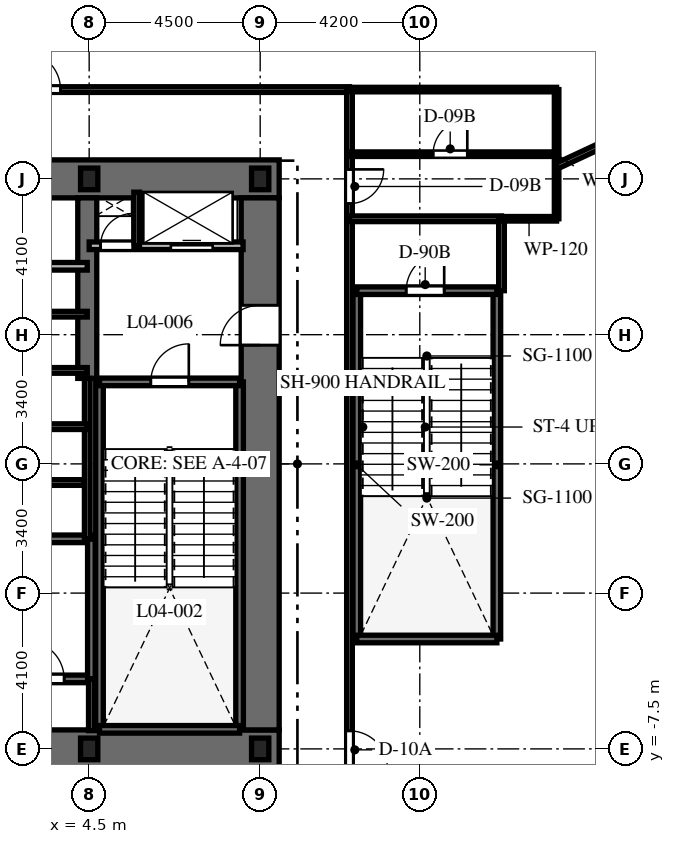
"""IFC4 building model, lengths in metres.
Left out: names, types, materials, properties, quantities, classifications, styles, units other than length and angle.
Written with IfcOpenShell. Run it as: python <this file> out.ifc"""

import sys

from ifc_helpers import new_model, si_unit, direction, frame, frame_2d, origin, origin_2d, place, context, subcontext, project, spatial, rectangle, i_section, extrude, element, fill, save


model = new_model("IFC4")
c1 = context("Model", 3, precision=1e-05, world=origin(), true_north=direction((0.0, 1.0)))
c2 = subcontext(c1, "Body", "Model", "MODEL_VIEW")
j1 = project(units=[si_unit("LENGTHUNIT", "METRE"), si_unit("PLANEANGLEUNIT", "RADIAN")], contexts=[c1])
p1 = place(None, origin())
s1 = spatial("IfcSite", under=j1, at=p1, CompositionType="ELEMENT")
p2 = place(p1, origin())
s2 = spatial("IfcBuilding", under=s1, at=p2, CompositionType="ELEMENT")
p3 = place(p2, frame((0.0, 0.0, 23.4)))
s3 = spatial("IfcBuildingStorey", under=s2, at=p3, CompositionType="ELEMENT", Elevation=23.4)
p4 = place(p3, frame((-9.5, -7.5, 0.0), z_axis=(0.0, 0.0, 1.0), x_axis=(1.0, 0.0, 0.0)))
e1 = element("IfcWall", 1, at=p4, inside=s3, PredefinedType="SHEAR", context=c2, shape_type="SweptSolid", body=[
    extrude(rectangle(XDim=19.0, YDim=1.0, at=frame_2d((9.5, 0.0))), origin(), (0.0, 0.0, 1.0), 4.8),
])
p5 = place(p4, frame((9.55, 0.0, 0.0)))
e2 = element("IfcOpeningElement", 2, at=p5, cuts=e1, PredefinedType="OPENING", context=c2, shape_type="SweptSolid", body=[
    extrude(rectangle(XDim=1.0, YDim=2.15, at=frame_2d((0.5, 1.075))), frame((0.0, 0.51, 0.0), z_axis=(0.0, -1.0, 0.0), x_axis=(1.0, 0.0, 0.0)), (0.0, 0.0, 1.0), 1.02),
])
p6 = place(p3, frame((1.85, 7.5, 0.0), z_axis=(0.0, 0.0, 1.0), x_axis=(1.0, 0.0, 0.0)))
e3 = element("IfcWall", 3, at=p6, inside=s3, PredefinedType="SHEAR", context=c2, shape_type="SweptSolid", body=[
    extrude(rectangle(XDim=7.65, YDim=1.0, at=frame_2d((3.825, 0.0))), origin(), (0.0, 0.0, 1.0), 4.8),
])
p7 = place(p3, frame((9.0, -7.0, 0.0), z_axis=(0.0, 0.0, 1.0), x_axis=(0.0, 1.0, 0.0)))
e4 = element("IfcWall", 4, at=p7, inside=s3, PredefinedType="SHEAR", context=c2, shape_type="SweptSolid", body=[
    extrude(rectangle(XDim=14.0, YDim=1.0, at=frame_2d((7.0, 0.0))), origin(), (0.0, 0.0, 1.0), 4.8),
])
p8 = place(p7, frame((10.125, 0.0, 0.0)))
e5 = element("IfcOpeningElement", 5, at=p8, cuts=e4, PredefinedType="OPENING", context=c2, shape_type="SweptSolid", body=[
    extrude(rectangle(XDim=1.05, YDim=2.15, at=frame_2d((0.525, 1.075))), frame((0.0, 0.51, 0.0), z_axis=(0.0, -1.0, 0.0), x_axis=(1.0, 0.0, 0.0)), (0.0, 0.0, 1.0), 1.02),
])
p9 = place(p3, frame((4.45, 2.25, 0.0), z_axis=(0.0, 0.0, 1.0), x_axis=(0.0, 1.0, 0.0)))
e6 = element("IfcWall", 6, at=p9, inside=s3, PredefinedType="SHEAR", context=c2, shape_type="SweptSolid", body=[
    extrude(rectangle(XDim=4.75, YDim=0.5, at=frame_2d((2.375, 0.0))), origin(), (0.0, 0.0, 1.0), 4.8),
])
for number, where, z_axis, x_axis in (
    (7, (4.772, -6.985, 0.0), (0.0, 0.0, 1.0), (0.0, 1.0, 0.0)),
    (8, (8.458, -6.985, 0.0), (0.0, 0.0, 1.0), (0.0, 1.0, 0.0)),
):
    element("IfcWall", number, at=place(p3, frame(where, z_axis=z_axis, x_axis=x_axis)), inside=s3, PredefinedType="SHEAR", context=c2, shape_type="SweptSolid", body=[
        extrude(rectangle(XDim=9.143, YDim=0.2, at=frame_2d((4.572, 0.0))), origin(), (0.0, 0.0, 1.0), 4.8),
    ])
p10 = place(p3, frame((4.772, -6.985, 0.0), z_axis=(0.0, 0.0, 1.0), x_axis=(1.0, 0.0, 0.0)))
e9 = element("IfcWall", 9, at=p10, inside=s3, PredefinedType="SHEAR", context=c2, shape_type="SweptSolid", body=[
    extrude(rectangle(XDim=3.686, YDim=0.2, at=frame_2d((1.843, 0.0))), origin(), (0.0, 0.0, 1.0), 4.8),
])
p11 = place(p3, frame((4.772, 2.158, 0.0), z_axis=(0.0, 0.0, 1.0), x_axis=(1.0, 0.0, 0.0)))
e10 = element("IfcWall", 10, at=p11, inside=s3, PredefinedType="SHEAR", context=c2, shape_type="SweptSolid", body=[
    extrude(rectangle(XDim=3.686, YDim=0.2, at=frame_2d((1.843, 0.0))), origin(), (0.0, 0.0, 1.0), 4.8),
])
p12 = place(p11, frame((1.35, 0.0, 0.0)))
e11 = element("IfcOpeningElement", 11, at=p12, cuts=e10, PredefinedType="OPENING", context=c2, shape_type="SweptSolid", body=[
    extrude(rectangle(XDim=1.0, YDim=2.15, at=frame_2d((0.5, 1.075))), frame((0.0, 0.11, 0.0), z_axis=(0.0, -1.0, 0.0), x_axis=(1.0, 0.0, 0.0)), (0.0, 0.0, 1.0), 0.22),
])
p13 = place(p3, frame((-4.608, -5.658, 0.0), z_axis=(0.0, 0.0, 1.0), x_axis=(1.0, 0.0, 0.0)))
e12 = element("IfcWall", 12, at=p13, inside=s3, PredefinedType="SHEAR", context=c2, shape_type="SweptSolid", body=[
    extrude(rectangle(XDim=9.166, YDim=0.2, at=frame_2d((4.583, 0.0))), origin(), (0.0, 0.0, 1.0), 4.8),
])
p14 = place(p13, frame((7.45, 0.0, 0.0)))
e13 = element("IfcOpeningElement", 13, at=p14, cuts=e12, PredefinedType="OPENING", context=c2, shape_type="SweptSolid", body=[
    extrude(rectangle(XDim=1.0, YDim=2.15, at=frame_2d((0.5, 1.075))), frame((0.0, 0.11, 0.0), z_axis=(0.0, -1.0, 0.0), x_axis=(1.0, 0.0, 0.0)), (0.0, 0.0, 1.0), 0.22),
])
p15 = place(p3, frame((-4.608, -1.972, 0.0), z_axis=(0.0, 0.0, 1.0), x_axis=(1.0, 0.0, 0.0)))
e14 = element("IfcWall", 14, at=p15, inside=s3, PredefinedType="SHEAR", context=c2, shape_type="SweptSolid", body=[
    extrude(rectangle(XDim=9.166, YDim=0.2, at=frame_2d((4.583, 0.0))), origin(), (0.0, 0.0, 1.0), 4.8),
])
p16 = place(p3, frame((4.558, -5.658, 0.0), z_axis=(0.0, 0.0, 1.0), x_axis=(0.0, 1.0, 0.0)))
e15 = element("IfcWall", 15, at=p16, inside=s3, PredefinedType="SHEAR", context=c2, shape_type="SweptSolid", body=[
    extrude(rectangle(XDim=3.686, YDim=0.2, at=frame_2d((1.843, 0.0))), origin(), (0.0, 0.0, 1.0), 4.8),
])
for number, where, z_axis, x_axis in (
    (16, (11.542, -4.608, 0.0), (0.0, 0.0, 1.0), (0.0, 1.0, 0.0)),
    (17, (15.228, -4.608, 0.0), (0.0, 0.0, 1.0), (0.0, 1.0, 0.0)),
):
    element("IfcWall", number, at=place(p3, frame(where, z_axis=z_axis, x_axis=x_axis)), inside=s3, PredefinedType="SHEAR", context=c2, shape_type="SweptSolid", body=[
        extrude(rectangle(XDim=9.166, YDim=0.2, at=frame_2d((4.583, 0.0))), origin(), (0.0, 0.0, 1.0), 4.8),
    ])
p17 = place(p3, frame((11.542, -4.608, 0.0), z_axis=(0.0, 0.0, 1.0), x_axis=(1.0, 0.0, 0.0)))
e18 = element("IfcWall", 18, at=p17, inside=s3, PredefinedType="SHEAR", context=c2, shape_type="SweptSolid", body=[
    extrude(rectangle(XDim=3.686, YDim=0.2, at=frame_2d((1.843, 0.0))), origin(), (0.0, 0.0, 1.0), 4.8),
])
p18 = place(p3, frame((11.542, 4.558, 0.0), z_axis=(0.0, 0.0, 1.0), x_axis=(1.0, 0.0, 0.0)))
e19 = element("IfcWall", 19, at=p18, inside=s3, PredefinedType="SHEAR", context=c2, shape_type="SweptSolid", body=[
    extrude(rectangle(XDim=3.686, YDim=0.2, at=frame_2d((1.843, 0.0))), origin(), (0.0, 0.0, 1.0), 4.8),
])
p19 = place(p18, frame((1.3, 0.0, 0.0)))
e20 = element("IfcOpeningElement", 20, at=p19, cuts=e19, PredefinedType="OPENING", context=c2, shape_type="SweptSolid", body=[
    extrude(rectangle(XDim=1.0, YDim=2.15, at=frame_2d((0.5, 1.075))), frame((0.0, 0.11, 0.0), z_axis=(0.0, -1.0, 0.0), x_axis=(1.0, 0.0, 0.0)), (0.0, 0.0, 1.0), 0.22),
])
for number, where, z_axis, x_axis in (
    (21, (4.5, -7.5, 0.0), (0.0, 0.0, 1.0), (1.0, 0.0, 0.0)),
    (22, (9.0, -7.5, 0.0), (0.0, 0.0, 1.0), (1.0, 0.0, 0.0)),
    (23, (9.0, 7.5, 0.0), (0.0, 0.0, 1.0), (1.0, 0.0, 0.0)),
    (24, (4.5, 7.5, 0.0), (0.0, 0.0, 1.0), (1.0, 0.0, 0.0)),
):
    element("IfcColumn", number, at=place(p3, frame(where, z_axis=z_axis, x_axis=x_axis)), inside=s3, PredefinedType="COLUMN", context=c2, shape_type="SweptSolid", body=[
        extrude(i_section(OverallWidth=0.454, OverallDepth=0.569, WebThickness=0.078, FlangeThickness=0.125, at=origin_2d()), origin(), (0.0, 0.0, 1.0), 4.8),
    ])
p20 = place(p3, frame((27.21, 2.626, 0.0), z_axis=(0.0, 0.0, 1.0), x_axis=(-0.416421752646, 0.909171559126, 0.0)))
e25 = element("IfcWall", 25, at=p20, inside=s3, PredefinedType="SOLIDWALL", context=c2, shape_type="SweptSolid", body=[
    extrude(rectangle(XDim=23.493, YDim=0.45, at=frame_2d((11.747, 0.0))), origin(), (0.0, 0.0, 1.0), 4.48),
])
p21 = place(p20, frame((3.57, 0.0, 0.85)))
e26 = element("IfcOpeningElement", 26, at=p21, cuts=e25, PredefinedType="OPENING", context=c2, shape_type="SweptSolid", body=[
    extrude(rectangle(XDim=2.4, YDim=2.4, at=frame_2d((1.2, 1.2))), frame((0.0, 0.235, 0.0), z_axis=(0.0, -1.0, 0.0), x_axis=(1.0, 0.0, 0.0)), (0.0, 0.0, 1.0), 0.47),
])
p22 = place(p20, frame((14.896, 0.0, 0.85)))
e27 = element("IfcOpeningElement", 27, at=p22, cuts=e25, PredefinedType="OPENING", context=c2, shape_type="SweptSolid", body=[
    extrude(rectangle(XDim=2.4, YDim=2.4, at=frame_2d((1.2, 1.2))), frame((0.0, 0.235, 0.0), z_axis=(0.0, -1.0, 0.0), x_axis=(1.0, 0.0, 0.0)), (0.0, 0.0, 1.0), 0.47),
])
p23 = place(p3, frame((4.558, -7.02, 0.0), z_axis=(0.0, 0.0, 1.0), x_axis=(0.0, 1.0, 0.0)))
e28 = element("IfcWall", 28, at=p23, inside=s3, PredefinedType="PARTITIONING", context=c2, shape_type="SweptSolid", body=[
    extrude(rectangle(XDim=1.362, YDim=0.15, at=frame_2d((0.681, 0.0))), origin(), (0.0, 0.0, 1.0), 4.48),
])
p24 = place(p3, frame((4.5, 5.74, 0.0), z_axis=(0.0, 0.0, 1.0), x_axis=(1.0, 0.0, 0.0)))
e29 = element("IfcWall", 29, at=p24, inside=s3, PredefinedType="PARTITIONING", context=c2, shape_type="SweptSolid", body=[
    extrude(rectangle(XDim=4.05, YDim=0.2, at=frame_2d((2.025, 0.0))), origin(), (0.0, 0.0, 1.0), 4.48),
])
p25 = place(p24, frame((0.3, 0.0, 0.0)))
e30 = element("IfcOpeningElement", 30, at=p25, cuts=e29, PredefinedType="OPENING", context=c2, shape_type="SweptSolid", body=[
    extrude(rectangle(XDim=0.85, YDim=2.03, at=frame_2d((0.425, 1.015))), frame((0.0, 0.11, 0.0), z_axis=(0.0, -1.0, 0.0), x_axis=(1.0, 0.0, 0.0)), (0.0, 0.0, 1.0), 0.22),
])
p26 = place(p24, frame((2.15, 0.0, 0.0)))
e31 = element("IfcOpeningElement", 31, at=p26, cuts=e29, PredefinedType="OPENING", context=c2, shape_type="SweptSolid", body=[
    extrude(rectangle(XDim=1.1, YDim=2.2, at=frame_2d((0.55, 1.1))), frame((0.0, 0.11, 0.0), z_axis=(0.0, -1.0, 0.0), x_axis=(1.0, 0.0, 0.0)), (0.0, 0.0, 1.0), 0.22),
])
p27 = place(p3, frame((5.75, 5.74, 0.0), z_axis=(0.0, 0.0, 1.0), x_axis=(0.0, 1.0, 0.0)))
e32 = element("IfcWall", 32, at=p27, inside=s3, PredefinedType="PARTITIONING", context=c2, shape_type="SweptSolid", body=[
    extrude(rectangle(XDim=1.41, YDim=0.15, at=frame_2d((0.705, 0.0))), origin(), (0.0, 0.0, 1.0), 4.48),
])
p28 = place(p3, frame((1.85, 5.2, 0.0), z_axis=(0.0, 0.0, 1.0), x_axis=(1.0, 0.0, 0.0)))
e33 = element("IfcWall", 33, at=p28, inside=s3, PredefinedType="PARTITIONING", context=c2, shape_type="SweptSolid", body=[
    extrude(rectangle(XDim=2.6, YDim=0.2, at=frame_2d((1.3, 0.0))), origin(), (0.0, 0.0, 1.0), 4.48),
])
p29 = place(p3, frame((4.45, -1.972, 0.0), z_axis=(0.0, 0.0, 1.0), x_axis=(0.0, 1.0, 0.0)))
e34 = element("IfcWall", 34, at=p29, inside=s3, PredefinedType="PARTITIONING", context=c2, shape_type="SweptSolid", body=[
    extrude(rectangle(XDim=4.222, YDim=0.15, at=frame_2d((2.111, 0.0))), origin(), (0.0, 0.0, 1.0), 4.48),
])
for number, where, z_axis, x_axis in (
    (35, (1.9, 3.94, 0.0), (0.0, 0.0, 1.0), (1.0, 0.0, 0.0)),
    (36, (1.9, 0.98, 0.0), (0.0, 0.0, 1.0), (1.0, 0.0, 0.0)),
    (37, (1.9, 2.46, 0.0), (0.0, 0.0, 1.0), (1.0, 0.0, 0.0)),
):
    element("IfcWall", number, at=place(p3, frame(where, z_axis=z_axis, x_axis=x_axis)), inside=s3, PredefinedType="PARTITIONING", context=c2, shape_type="SweptSolid", body=[
        extrude(rectangle(XDim=2.55, YDim=0.15, at=frame_2d((1.275, 0.0))), origin(), (0.0, 0.0, 1.0), 4.48),
    ])
p30 = place(p3, frame((-4.36, -0.49, 0.0), z_axis=(0.0, 0.0, 1.0), x_axis=(1.0, 0.0, 0.0)))
e38 = element("IfcWall", 38, at=p30, inside=s3, PredefinedType="PARTITIONING", context=c2, shape_type="SweptSolid", body=[
    extrude(rectangle(XDim=8.72, YDim=0.15, at=frame_2d((4.36, 0.0))), origin(), (0.0, 0.0, 1.0), 4.48),
])
p31 = place(p30, frame((3.16, 0.0, 0.0)))
e39 = element("IfcOpeningElement", 39, at=p31, cuts=e38, PredefinedType="OPENING", context=c2, shape_type="SweptSolid", body=[
    extrude(rectangle(XDim=0.85, YDim=2.03, at=frame_2d((0.425, 1.015))), frame((0.0, 0.085, 0.0), z_axis=(0.0, -1.0, 0.0), x_axis=(1.0, 0.0, 0.0)), (0.0, 0.0, 1.0), 0.17),
])
p32 = place(p30, frame((5.21, 0.0, 0.0)))
e40 = element("IfcOpeningElement", 40, at=p32, cuts=e38, PredefinedType="OPENING", context=c2, shape_type="SweptSolid", body=[
    extrude(rectangle(XDim=0.85, YDim=2.03, at=frame_2d((0.425, 1.015))), frame((0.0, 0.085, 0.0), z_axis=(0.0, -1.0, 0.0), x_axis=(1.0, 0.0, 0.0)), (0.0, 0.0, 1.0), 0.17),
])
p33 = place(p3, frame((-11.35, 9.85, 0.0), z_axis=(0.0, 0.0, 1.0), x_axis=(1.0, 0.0, 0.0)))
e41 = element("IfcWall", 41, at=p33, inside=s3, PredefinedType="PARTITIONING", context=c2, shape_type="SweptSolid", body=[
    extrude(rectangle(XDim=22.7, YDim=0.15, at=frame_2d((11.35, 0.0))), origin(), (0.0, 0.0, 1.0), 3.522),
])
p34 = place(p33, frame((14.096, 0.0, 0.0)))
e42 = element("IfcOpeningElement", 42, at=p34, cuts=e41, PredefinedType="OPENING", context=c2, shape_type="SweptSolid", body=[
    extrude(rectangle(XDim=1.0, YDim=2.03, at=frame_2d((0.5, 1.015))), frame((0.0, 0.085, 0.0), z_axis=(0.0, -1.0, 0.0), x_axis=(1.0, 0.0, 0.0)), (0.0, 0.0, 1.0), 0.17),
])
p35 = place(p3, frame((11.35, 9.85, 0.0), z_axis=(0.0, 0.0, 1.0), x_axis=(0.0, -1.0, 0.0)))
e43 = element("IfcWall", 43, at=p35, inside=s3, PredefinedType="PARTITIONING", context=c2, shape_type="SweptSolid", body=[
    extrude(rectangle(XDim=19.7, YDim=0.15, at=frame_2d((9.85, 0.0))), origin(), (0.0, 0.0, 1.0), 3.522),
])
p36 = place(p35, frame((2.1, 0.0, 0.0)))
e44 = element("IfcOpeningElement", 44, at=p36, cuts=e43, PredefinedType="OPENING", context=c2, shape_type="SweptSolid", body=[
    extrude(rectangle(XDim=0.9, YDim=2.03, at=frame_2d((0.45, 1.015))), frame((0.0, 0.085, 0.0), z_axis=(0.0, -1.0, 0.0), x_axis=(1.0, 0.0, 0.0)), (0.0, 0.0, 1.0), 0.17),
])
p37 = place(p35, frame((16.875, 0.0, 0.0)))
e45 = element("IfcOpeningElement", 45, at=p37, cuts=e43, PredefinedType="OPENING", context=c2, shape_type="SweptSolid", body=[
    extrude(rectangle(XDim=1.0, YDim=2.03, at=frame_2d((0.5, 1.015))), frame((0.0, 0.085, 0.0), z_axis=(0.0, -1.0, 0.0), x_axis=(1.0, 0.0, 0.0)), (0.0, 0.0, 1.0), 0.17),
])
p38 = place(p3, frame((11.35, 6.45, 0.0), z_axis=(0.0, 0.0, 1.0), x_axis=(1.0, 0.0, 0.0)))
e46 = element("IfcWall", 46, at=p38, inside=s3, PredefinedType="PARTITIONING", context=c2, shape_type="SweptSolid", body=[
    extrude(rectangle(XDim=4.0, YDim=0.15, at=frame_2d((2.0, 0.0))), origin(), (0.0, 0.0, 1.0), 4.48),
])
p39 = place(p3, frame((15.35, 4.558, 0.0), z_axis=(0.0, 0.0, 1.0), x_axis=(0.0, 1.0, 0.0)))
e47 = element("IfcWall", 47, at=p39, inside=s3, PredefinedType="PARTITIONING", context=c2, shape_type="SweptSolid", body=[
    extrude(rectangle(XDim=1.892, YDim=0.15, at=frame_2d((0.946, 0.0))), origin(), (0.0, 0.0, 1.0), 4.48),
])
p40 = place(p3, frame((15.35, 6.45, 0.0), z_axis=(0.0, 0.0, 1.0), x_axis=(1.0, 0.0, 0.0)))
e48 = element("IfcWall", 48, at=p40, inside=s3, PredefinedType="PARTITIONING", context=c2, shape_type="SweptSolid", body=[
    extrude(rectangle(XDim=1.45, YDim=0.12, at=frame_2d((0.725, 0.0))), origin(), (0.0, 0.0, 1.0), 4.48),
])
p41 = place(p3, frame((16.8, 6.45, 0.0), z_axis=(0.0, 0.0, 1.0), x_axis=(0.0, 1.0, 0.0)))
e49 = element("IfcWall", 49, at=p41, inside=s3, PredefinedType="PARTITIONING", context=c2, shape_type="SweptSolid", body=[
    extrude(rectangle(XDim=3.4, YDim=0.12, at=frame_2d((1.7, 0.0))), origin(), (0.0, 0.0, 1.0), 4.48),
])
p42 = place(p3, frame((11.35, 9.85, 0.0), z_axis=(0.0, 0.0, 1.0), x_axis=(1.0, 0.0, 0.0)))
e50 = element("IfcWall", 50, at=p42, inside=s3, PredefinedType="PARTITIONING", context=c2, shape_type="SweptSolid", body=[
    extrude(rectangle(XDim=5.45, YDim=0.12, at=frame_2d((2.725, 0.0))), origin(), (0.0, 0.0, 1.0), 3.615),
])
p43 = place(p3, frame((11.35, 8.15, 0.0), z_axis=(0.0, 0.0, 1.0), x_axis=(1.0, 0.0, 0.0)))
e51 = element("IfcWall", 51, at=p43, inside=s3, PredefinedType="PARTITIONING", context=c2, shape_type="SweptSolid", body=[
    extrude(rectangle(XDim=5.45, YDim=0.12, at=frame_2d((2.725, 0.0))), origin(), (0.0, 0.0, 1.0), 4.48),
])
p44 = place(p43, frame((2.2, 0.0, 0.0)))
e52 = element("IfcOpeningElement", 52, at=p44, cuts=e51, PredefinedType="OPENING", context=c2, shape_type="SweptSolid", body=[
    extrude(rectangle(XDim=0.9, YDim=2.03, at=frame_2d((0.45, 1.015))), frame((0.0, 0.07, 0.0), z_axis=(0.0, -1.0, 0.0), x_axis=(1.0, 0.0, 0.0)), (0.0, 0.0, 1.0), 0.14),
])
p45 = place(p3, frame((16.8, 7.834, 0.0), z_axis=(0.0, 0.0, 1.0), x_axis=(0.906307919131, 0.422617978463, 0.0)))
e53 = element("IfcWall", 53, at=p45, inside=s3, PredefinedType="PARTITIONING", context=c2, shape_type="SweptSolid", body=[
    extrude(rectangle(XDim=7.296, YDim=0.15, at=frame_2d((3.648, 0.0))), origin(), (0.0, 0.0, 1.0), 3.615),
])
p46 = place(p12, origin())
e54 = element("IfcDoor", 54, at=p46, inside=s3, OperationType="SINGLE_SWING_RIGHT", PredefinedType="DOOR", context=c2, shape_type="SweptSolid", body=[
    extrude(rectangle(XDim=1.0, YDim=2.15, at=frame_2d((0.5, 1.075))), frame((0.0, 0.025, 0.0), z_axis=(0.0, -1.0, 0.0), x_axis=(1.0, 0.0, 0.0)), (0.0, 0.0, 1.0), 0.05),
])
fill(e11, e54)
p47 = place(p14, origin())
e55 = element("IfcDoor", 55, at=p47, inside=s3, OperationType="SINGLE_SWING_LEFT", PredefinedType="DOOR", context=c2, shape_type="SweptSolid", body=[
    extrude(rectangle(XDim=1.0, YDim=2.15, at=frame_2d((0.5, 1.075))), frame((0.0, 0.025, 0.0), z_axis=(0.0, -1.0, 0.0), x_axis=(1.0, 0.0, 0.0)), (0.0, 0.0, 1.0), 0.05),
])
fill(e13, e55)
p48 = place(p8, origin())
e56 = element("IfcDoor", 56, at=p48, inside=s3, OperationType="SINGLE_SWING_LEFT", PredefinedType="DOOR", context=c2, shape_type="SweptSolid", body=[
    extrude(rectangle(XDim=1.05, YDim=2.15, at=frame_2d((0.525, 1.075))), frame((0.0, 0.025, 0.0), z_axis=(0.0, -1.0, 0.0), x_axis=(1.0, 0.0, 0.0)), (0.0, 0.0, 1.0), 0.05),
])
fill(e5, e56)
p49 = place(p25, origin())
e57 = element("IfcDoor", 57, at=p49, inside=s3, OperationType="SINGLE_SWING_RIGHT", PredefinedType="DOOR", context=c2, shape_type="SweptSolid", body=[
    extrude(rectangle(XDim=0.85, YDim=2.03, at=frame_2d((0.425, 1.015))), frame((0.0, 0.025, 0.0), z_axis=(0.0, -1.0, 0.0), x_axis=(1.0, 0.0, 0.0)), (0.0, 0.0, 1.0), 0.05),
])
fill(e30, e57)
p50 = place(p26, origin())
e58 = element("IfcDoor", 58, at=p50, inside=s3, OperationType="SLIDING_TO_RIGHT", PredefinedType="DOOR", context=c2, shape_type="SweptSolid", body=[
    extrude(rectangle(XDim=1.1, YDim=2.2, at=frame_2d((0.55, 1.1))), frame((0.0, 0.025, 0.0), z_axis=(0.0, -1.0, 0.0), x_axis=(1.0, 0.0, 0.0)), (0.0, 0.0, 1.0), 0.05),
])
fill(e31, e58)
p51 = place(p19, origin())
e59 = element("IfcDoor", 59, at=p51, inside=s3, OperationType="SINGLE_SWING_RIGHT", PredefinedType="DOOR", context=c2, shape_type="SweptSolid", body=[
    extrude(rectangle(XDim=1.0, YDim=2.15, at=frame_2d((0.5, 1.075))), frame((0.0, 0.025, 0.0), z_axis=(0.0, -1.0, 0.0), x_axis=(1.0, 0.0, 0.0)), (0.0, 0.0, 1.0), 0.05),
])
fill(e20, e59)
p52 = place(p36, origin())
e60 = element("IfcDoor", 60, at=p52, inside=s3, OperationType="SINGLE_SWING_LEFT", PredefinedType="DOOR", context=c2, shape_type="SweptSolid", body=[
    extrude(rectangle(XDim=0.9, YDim=2.03, at=frame_2d((0.45, 1.015))), frame((0.0, 0.025, 0.0), z_axis=(0.0, -1.0, 0.0), x_axis=(1.0, 0.0, 0.0)), (0.0, 0.0, 1.0), 0.05),
])
fill(e44, e60)
p53 = place(p44, origin())
e61 = element("IfcDoor", 61, at=p53, inside=s3, OperationType="SINGLE_SWING_RIGHT", PredefinedType="DOOR", context=c2, shape_type="SweptSolid", body=[
    extrude(rectangle(XDim=0.9, YDim=2.03, at=frame_2d((0.45, 1.015))), frame((0.0, 0.025, 0.0), z_axis=(0.0, -1.0, 0.0), x_axis=(1.0, 0.0, 0.0)), (0.0, 0.0, 1.0), 0.05),
])
fill(e52, e61)
p54 = place(p37, origin())
e62 = element("IfcDoor", 62, at=p54, inside=s3, OperationType="SINGLE_SWING_RIGHT", PredefinedType="DOOR", context=c2, shape_type="SweptSolid", body=[
    extrude(rectangle(XDim=1.0, YDim=2.03, at=frame_2d((0.5, 1.015))), frame((0.0, 0.025, 0.0), z_axis=(0.0, -1.0, 0.0), x_axis=(1.0, 0.0, 0.0)), (0.0, 0.0, 1.0), 0.05),
])
fill(e45, e62)
p55 = place(p34, origin())
e63 = element("IfcDoor", 63, at=p55, inside=s3, OperationType="SINGLE_SWING_LEFT", PredefinedType="DOOR", context=c2, shape_type="SweptSolid", body=[
    extrude(rectangle(XDim=1.0, YDim=2.03, at=frame_2d((0.5, 1.015))), frame((0.0, 0.025, 0.0), z_axis=(0.0, -1.0, 0.0), x_axis=(1.0, 0.0, 0.0)), (0.0, 0.0, 1.0), 0.05),
])
fill(e42, e63)
save(model, sys.argv[1])
